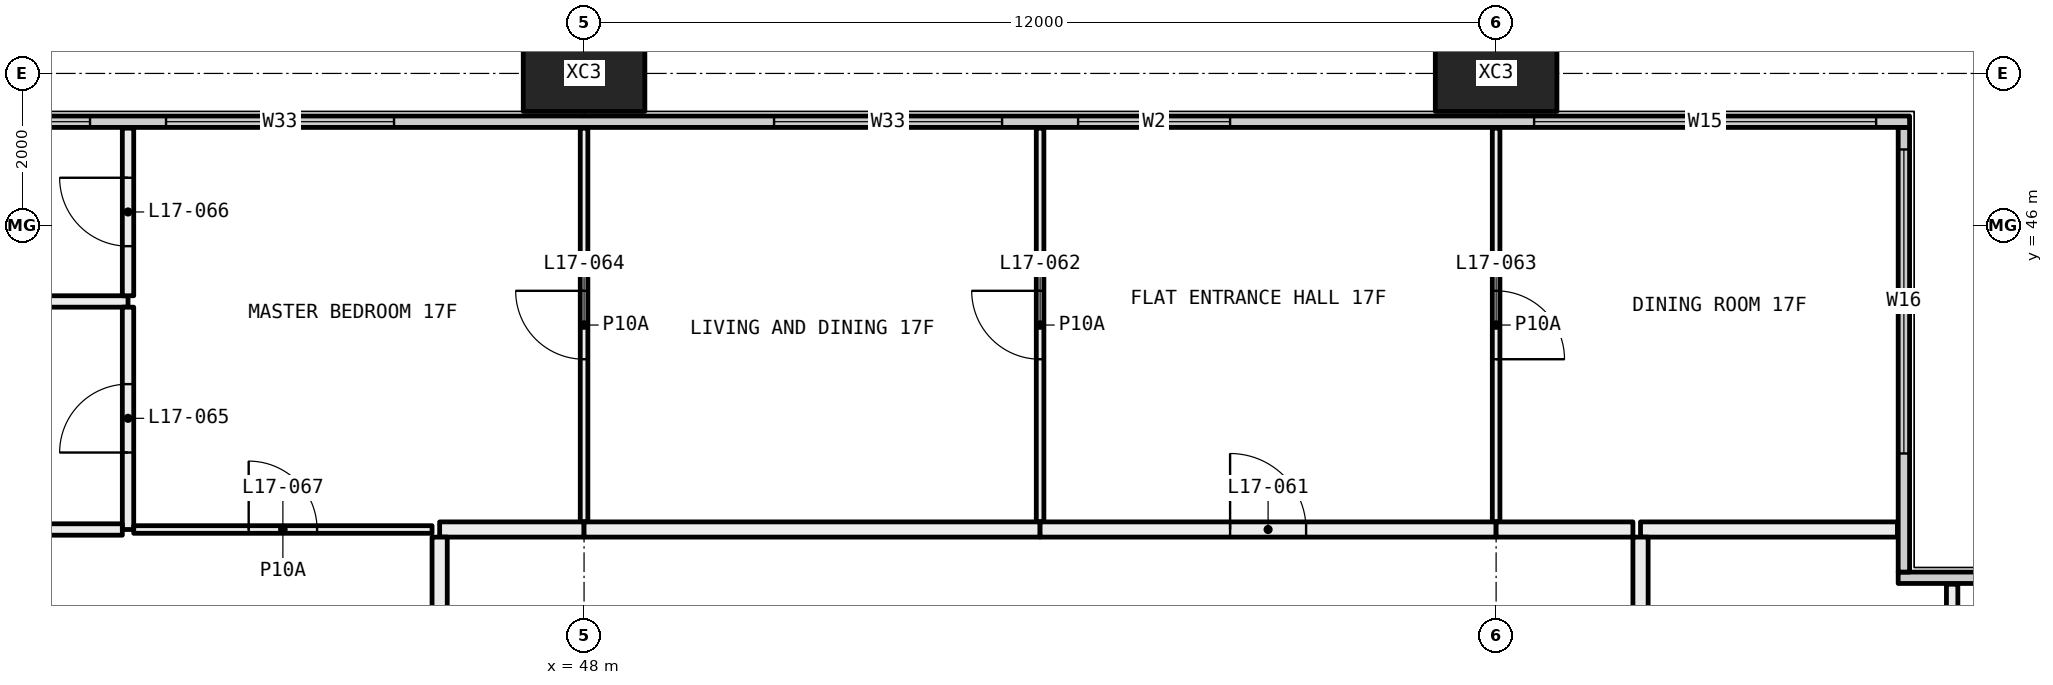
"""IFC4 building model, lengths in metres.
Left out: names, types, materials, properties, quantities, classifications, styles, units other than length and angle.
Written with IfcOpenShell. Run it as: python <this file> out.ifc"""

import sys

from ifc_helpers import new_model, si_unit, direction, frame, frame_2d, origin, origin_2d, place, context, subcontext, project, spatial, rectangle, hollow_rectangle, extrude, element, fill, save


model = new_model("IFC4")
c1 = context("Model", 3, precision=1e-05, world=origin(), true_north=direction((0.0, 1.0)))
c2 = subcontext(c1, "Body", "Model", "MODEL_VIEW")
j1 = project(units=[si_unit("LENGTHUNIT", "METRE"), si_unit("PLANEANGLEUNIT", "RADIAN")], contexts=[c1])
p1 = place(None, origin())
s1 = spatial("IfcSite", under=j1, at=p1, CompositionType="ELEMENT")
p2 = place(p1, origin())
s2 = spatial("IfcBuilding", under=s1, at=p2, CompositionType="ELEMENT")
p3 = place(p2, frame((0.0, 0.0, 71.4)))
s3 = spatial("IfcBuildingStorey", under=s2, at=p3, CompositionType="ELEMENT", Elevation=71.4)
for number, where, z_axis, x_axis in (
    (1, (48.0, 48.0, -0.4), (0.0, 0.0, 1.0), (1.0, 0.0, 0.0)),
    (2, (60.0, 48.0, -0.4), (0.0, 0.0, 1.0), (1.0, 0.0, 0.0)),
):
    element("IfcColumn", number, at=place(p3, frame(where, z_axis=z_axis, x_axis=x_axis)), inside=s3, PredefinedType="COLUMN", context=c2, shape_type="SweptSolid", body=[
        extrude(hollow_rectangle(XDim=1.6, YDim=1.0, WallThickness=0.065, at=origin_2d()), origin(), (0.0, 0.0, 1.0), 3.45),
    ])
p4 = place(p3, frame((65.29, 41.365, 0.0), z_axis=(0.0, 0.0, 1.0), x_axis=(1.0, 0.0, 0.0)))
e3 = element("IfcWall", 3, at=p4, inside=s3, PredefinedType="ELEMENTEDWALL", context=c2, shape_type="SweptSolid", body=[
    extrude(rectangle(XDim=6.15, YDim=0.15, at=frame_2d((3.075, 0.0))), origin(), (0.0, 0.0, 1.0), 3.05),
])
p5 = place(p4, frame((1.71, 0.0, 0.45)))
e4 = element("IfcOpeningElement", 4, at=p5, cuts=e3, PredefinedType="OPENING", context=c2, shape_type="SweptSolid", body=[
    extrude(rectangle(XDim=4.0, YDim=2.55, at=frame_2d((2.0, 1.275))), frame((0.0, 0.085, 0.0), z_axis=(0.0, -1.0, 0.0), x_axis=(1.0, 0.0, 0.0)), (0.0, 0.0, 1.0), 0.17),
])
p6 = place(p3, frame((65.365, 41.44, 0.0), z_axis=(0.0, 0.0, 1.0), x_axis=(0.0, 1.0, 0.0)))
e5 = element("IfcWall", 5, at=p6, inside=s3, PredefinedType="ELEMENTEDWALL", context=c2, shape_type="SweptSolid", body=[
    extrude(rectangle(XDim=5.85, YDim=0.15, at=frame_2d((2.925, 0.0))), origin(), (0.0, 0.0, 1.0), 3.05),
])
p7 = place(p6, frame((1.56, 0.0, 0.45)))
e6 = element("IfcOpeningElement", 6, at=p7, cuts=e5, PredefinedType="OPENING", context=c2, shape_type="SweptSolid", body=[
    extrude(rectangle(XDim=4.0, YDim=2.55, at=frame_2d((2.0, 1.275))), frame((0.0, 0.085, 0.0), z_axis=(0.0, -1.0, 0.0), x_axis=(1.0, 0.0, 0.0)), (0.0, 0.0, 1.0), 0.17),
])
p8 = place(p3, frame((6.56, 47.365, 0.0), z_axis=(0.0, 0.0, 1.0), x_axis=(1.0, 0.0, 0.0)))
e7 = element("IfcWall", 7, at=p8, inside=s3, PredefinedType="ELEMENTEDWALL", context=c2, shape_type="SweptSolid", body=[
    extrude(rectangle(XDim=58.88, YDim=0.15, at=frame_2d((29.44, 0.0))), origin(), (0.0, 0.0, 1.0), 3.05),
])
p9 = place(p8, frame((0.44, 0.0, 0.45)))
e8 = element("IfcOpeningElement", 8, at=p9, cuts=e7, PredefinedType="OPENING", context=c2, shape_type="SweptSolid", body=[
    extrude(rectangle(XDim=4.5, YDim=2.55, at=frame_2d((2.25, 1.275))), frame((0.0, 0.085, 0.0), z_axis=(0.0, -1.0, 0.0), x_axis=(1.0, 0.0, 0.0)), (0.0, 0.0, 1.0), 0.17),
])
p10 = place(p8, frame((7.94, 0.0, 0.45)))
e9 = element("IfcOpeningElement", 9, at=p10, cuts=e7, PredefinedType="OPENING", context=c2, shape_type="SweptSolid", body=[
    extrude(rectangle(XDim=3.0, YDim=2.55, at=frame_2d((1.5, 1.275))), frame((0.0, 0.085, 0.0), z_axis=(0.0, -1.0, 0.0), x_axis=(1.0, 0.0, 0.0)), (0.0, 0.0, 1.0), 0.17),
])
p11 = place(p8, frame((11.94, 0.0, 0.45)))
e10 = element("IfcOpeningElement", 10, at=p11, cuts=e7, PredefinedType="OPENING", context=c2, shape_type="SweptSolid", body=[
    extrude(rectangle(XDim=3.0, YDim=2.55, at=frame_2d((1.5, 1.275))), frame((0.0, 0.085, 0.0), z_axis=(0.0, -1.0, 0.0), x_axis=(1.0, 0.0, 0.0)), (0.0, 0.0, 1.0), 0.17),
])
p12 = place(p8, frame((19.94, 0.0, 0.45)))
e11 = element("IfcOpeningElement", 11, at=p12, cuts=e7, PredefinedType="OPENING", context=c2, shape_type="SweptSolid", body=[
    extrude(rectangle(XDim=3.0, YDim=2.55, at=frame_2d((1.5, 1.275))), frame((0.0, 0.085, 0.0), z_axis=(0.0, -1.0, 0.0), x_axis=(1.0, 0.0, 0.0)), (0.0, 0.0, 1.0), 0.17),
])
p13 = place(p8, frame((23.94, 0.0, 0.45)))
e12 = element("IfcOpeningElement", 12, at=p13, cuts=e7, PredefinedType="OPENING", context=c2, shape_type="SweptSolid", body=[
    extrude(rectangle(XDim=2.0, YDim=2.55, at=frame_2d((1.0, 1.275))), frame((0.0, 0.085, 0.0), z_axis=(0.0, -1.0, 0.0), x_axis=(1.0, 0.0, 0.0)), (0.0, 0.0, 1.0), 0.17),
])
p14 = place(p8, frame((31.94, 0.0, 0.45)))
e13 = element("IfcOpeningElement", 13, at=p14, cuts=e7, PredefinedType="OPENING", context=c2, shape_type="SweptSolid", body=[
    extrude(rectangle(XDim=3.0, YDim=2.55, at=frame_2d((1.5, 1.275))), frame((0.0, 0.085, 0.0), z_axis=(0.0, -1.0, 0.0), x_axis=(1.0, 0.0, 0.0)), (0.0, 0.0, 1.0), 0.17),
])
p15 = place(p8, frame((35.94, 0.0, 0.45)))
e14 = element("IfcOpeningElement", 14, at=p15, cuts=e7, PredefinedType="OPENING", context=c2, shape_type="SweptSolid", body=[
    extrude(rectangle(XDim=3.0, YDim=2.55, at=frame_2d((1.5, 1.275))), frame((0.0, 0.085, 0.0), z_axis=(0.0, -1.0, 0.0), x_axis=(1.0, 0.0, 0.0)), (0.0, 0.0, 1.0), 0.17),
])
p16 = place(p8, frame((43.94, 0.0, 0.45)))
e15 = element("IfcOpeningElement", 15, at=p16, cuts=e7, PredefinedType="OPENING", context=c2, shape_type="SweptSolid", body=[
    extrude(rectangle(XDim=3.0, YDim=2.55, at=frame_2d((1.5, 1.275))), frame((0.0, 0.085, 0.0), z_axis=(0.0, -1.0, 0.0), x_axis=(1.0, 0.0, 0.0)), (0.0, 0.0, 1.0), 0.17),
])
p17 = place(p8, frame((47.94, 0.0, 0.45)))
e16 = element("IfcOpeningElement", 16, at=p17, cuts=e7, PredefinedType="OPENING", context=c2, shape_type="SweptSolid", body=[
    extrude(rectangle(XDim=2.0, YDim=2.55, at=frame_2d((1.0, 1.275))), frame((0.0, 0.085, 0.0), z_axis=(0.0, -1.0, 0.0), x_axis=(1.0, 0.0, 0.0)), (0.0, 0.0, 1.0), 0.17),
])
p18 = place(p8, frame((53.94, 0.0, 0.45)))
e17 = element("IfcOpeningElement", 17, at=p18, cuts=e7, PredefinedType="OPENING", context=c2, shape_type="SweptSolid", body=[
    extrude(rectangle(XDim=4.5, YDim=2.55, at=frame_2d((2.25, 1.275))), frame((0.0, 0.085, 0.0), z_axis=(0.0, -1.0, 0.0), x_axis=(1.0, 0.0, 0.0)), (0.0, 0.0, 1.0), 0.17),
])
p19 = place(p3, frame((66.0, 41.28, 0.0), z_axis=(0.0, 0.0, 1.0), x_axis=(0.0, -1.0, 0.0)))
e18 = element("IfcWall", 18, at=p19, inside=s3, PredefinedType="PARTITIONING", context=c2, shape_type="SweptSolid", body=[
    extrude(rectangle(XDim=2.28, YDim=0.15, at=frame_2d((1.14, 0.0))), origin(), (0.0, 0.0, 1.0), 3.05),
])
p20 = place(p3, frame((65.28, 42.0, 0.0), z_axis=(0.0, 0.0, 1.0), x_axis=(-1.0, 0.0, 0.0)))
e19 = element("IfcWall", 19, at=p20, inside=s3, PredefinedType="PARTITIONING", context=c2, shape_type="SweptSolid", body=[
    extrude(rectangle(XDim=3.38, YDim=0.2, at=frame_2d((1.69, 0.0))), origin(), (0.0, 0.0, 1.0), 3.05),
])
p21 = place(p3, frame((61.9, 41.9, 0.0), z_axis=(0.0, 0.0, 1.0), x_axis=(0.0, -1.0, 0.0)))
e20 = element("IfcWall", 20, at=p21, inside=s3, PredefinedType="PARTITIONING", context=c2, shape_type="SweptSolid", body=[
    extrude(rectangle(XDim=2.9, YDim=0.2, at=frame_2d((1.45, 0.0))), origin(), (0.0, 0.0, 1.0), 3.05),
])
p22 = place(p3, frame((42.0, 45.0, 0.0), z_axis=(0.0, 0.0, 1.0), x_axis=(-1.0, 0.0, 0.0)))
e21 = element("IfcWall", 21, at=p22, inside=s3, PredefinedType="PARTITIONING", context=c2, shape_type="SweptSolid", body=[
    extrude(rectangle(XDim=5.9, YDim=0.15, at=frame_2d((2.95, 0.0))), origin(), (0.0, 0.0, 1.0), 3.05),
])
p23 = place(p3, frame((42.0, 42.0, 0.0), z_axis=(0.0, 0.0, 1.0), x_axis=(0.0, 1.0, 0.0)))
e22 = element("IfcWall", 22, at=p23, inside=s3, PredefinedType="PARTITIONING", context=c2, shape_type="SweptSolid", body=[
    extrude(rectangle(XDim=2.925, YDim=0.15, at=frame_2d((1.462, 0.0))), origin(), (0.0, 0.0, 1.0), 3.05),
])
p24 = place(p23, frame((1.012, 0.0, 0.0)))
e23 = element("IfcOpeningElement", 23, at=p24, cuts=e22, PredefinedType="OPENING", context=c2, shape_type="SweptSolid", body=[
    extrude(rectangle(XDim=0.9, YDim=2.1, at=frame_2d((0.45, 1.05))), frame((0.0, 0.085, 0.0), z_axis=(0.0, -1.0, 0.0), x_axis=(1.0, 0.0, 0.0)), (0.0, 0.0, 1.0), 0.17),
])
p25 = place(p3, frame((40.9, 42.0, 0.0), z_axis=(0.0, 0.0, 1.0), x_axis=(1.0, 0.0, 0.0)))
e24 = element("IfcWall", 24, at=p25, inside=s3, PredefinedType="PARTITIONING", context=c2, shape_type="SweptSolid", body=[
    extrude(rectangle(XDim=1.025, YDim=0.15, at=frame_2d((0.513, 0.0))), origin(), (0.0, 0.0, 1.0), 3.05),
])
p26 = place(p3, frame((42.0, 45.075, 0.0), z_axis=(0.0, 0.0, 1.0), x_axis=(0.0, 1.0, 0.0)))
e25 = element("IfcWall", 25, at=p26, inside=s3, PredefinedType="PARTITIONING", context=c2, shape_type="SweptSolid", body=[
    extrude(rectangle(XDim=2.205, YDim=0.15, at=frame_2d((1.103, 0.0))), origin(), (0.0, 0.0, 1.0), 3.05),
])
p27 = place(p26, frame((0.653, 0.0, 0.0)))
e26 = element("IfcOpeningElement", 26, at=p27, cuts=e25, PredefinedType="OPENING", context=c2, shape_type="SweptSolid", body=[
    extrude(rectangle(XDim=0.9, YDim=2.1, at=frame_2d((0.45, 1.05))), frame((0.0, 0.085, 0.0), z_axis=(0.0, -1.0, 0.0), x_axis=(1.0, 0.0, 0.0)), (0.0, 0.0, 1.0), 0.17),
])
p28 = place(p3, frame((48.0, 42.1, 0.0), z_axis=(0.0, 0.0, 1.0), x_axis=(0.0, 1.0, 0.0)))
e27 = element("IfcWall", 27, at=p28, inside=s3, PredefinedType="PARTITIONING", context=c2, shape_type="SweptSolid", body=[
    extrude(rectangle(XDim=5.18, YDim=0.1, at=frame_2d((2.59, 0.0))), origin(), (0.0, 0.0, 1.0), 3.05),
])
p29 = place(p28, frame((2.14, 0.0, 0.0)))
e28 = element("IfcOpeningElement", 28, at=p29, cuts=e27, PredefinedType="OPENING", context=c2, shape_type="SweptSolid", body=[
    extrude(rectangle(XDim=0.9, YDim=2.1, at=frame_2d((0.45, 1.05))), frame((0.0, 0.06, 0.0), z_axis=(0.0, -1.0, 0.0), x_axis=(1.0, 0.0, 0.0)), (0.0, 0.0, 1.0), 0.12),
])
p30 = place(p3, frame((42.075, 42.0, 0.0), z_axis=(0.0, 0.0, 1.0), x_axis=(1.0, 0.0, 0.0)))
e29 = element("IfcWall", 29, at=p30, inside=s3, PredefinedType="PARTITIONING", context=c2, shape_type="SweptSolid", body=[
    extrude(rectangle(XDim=3.925, YDim=0.1, at=frame_2d((1.962, 0.0))), origin(), (0.0, 0.0, 1.0), 3.05),
])
p31 = place(p30, frame((1.512, 0.0, 0.0)))
e30 = element("IfcOpeningElement", 30, at=p31, cuts=e29, PredefinedType="OPENING", context=c2, shape_type="SweptSolid", body=[
    extrude(rectangle(XDim=0.9, YDim=2.1, at=frame_2d((0.45, 1.05))), frame((0.0, 0.06, 0.0), z_axis=(0.0, -1.0, 0.0), x_axis=(1.0, 0.0, 0.0)), (0.0, 0.0, 1.0), 0.12),
])
p32 = place(p3, frame((46.1, 42.0, 0.0), z_axis=(0.0, 0.0, 1.0), x_axis=(1.0, 0.0, 0.0)))
e31 = element("IfcWall", 31, at=p32, inside=s3, PredefinedType="PARTITIONING", context=c2, shape_type="SweptSolid", body=[
    extrude(rectangle(XDim=1.9, YDim=0.2, at=frame_2d((0.95, 0.0))), origin(), (0.0, 0.0, 1.0), 3.05),
])
p33 = place(p3, frame((54.0, 42.1, 0.0), z_axis=(0.0, 0.0, 1.0), x_axis=(0.0, 1.0, 0.0)))
e32 = element("IfcWall", 32, at=p33, inside=s3, PredefinedType="PARTITIONING", context=c2, shape_type="SweptSolid", body=[
    extrude(rectangle(XDim=5.18, YDim=0.1, at=frame_2d((2.59, 0.0))), origin(), (0.0, 0.0, 1.0), 3.05),
])
p34 = place(p33, frame((2.14, 0.0, 0.0)))
e33 = element("IfcOpeningElement", 33, at=p34, cuts=e32, PredefinedType="OPENING", context=c2, shape_type="SweptSolid", body=[
    extrude(rectangle(XDim=0.9, YDim=2.1, at=frame_2d((0.45, 1.05))), frame((0.0, 0.06, 0.0), z_axis=(0.0, -1.0, 0.0), x_axis=(1.0, 0.0, 0.0)), (0.0, 0.0, 1.0), 0.12),
])
p35 = place(p3, frame((48.0, 42.0, 0.0), z_axis=(0.0, 0.0, 1.0), x_axis=(1.0, 0.0, 0.0)))
e34 = element("IfcWall", 34, at=p35, inside=s3, PredefinedType="PARTITIONING", context=c2, shape_type="SweptSolid", body=[
    extrude(rectangle(XDim=6.0, YDim=0.2, at=frame_2d((3.0, 0.0))), origin(), (0.0, 0.0, 1.0), 3.05),
])
p36 = place(p3, frame((60.0, 42.1, 0.0), z_axis=(0.0, 0.0, 1.0), x_axis=(0.0, 1.0, 0.0)))
e35 = element("IfcWall", 35, at=p36, inside=s3, PredefinedType="PARTITIONING", context=c2, shape_type="SweptSolid", body=[
    extrude(rectangle(XDim=5.18, YDim=0.1, at=frame_2d((2.59, 0.0))), origin(), (0.0, 0.0, 1.0), 3.05),
])
p37 = place(p36, frame((2.14, 0.0, 0.0)))
e36 = element("IfcOpeningElement", 36, at=p37, cuts=e35, PredefinedType="OPENING", context=c2, shape_type="SweptSolid", body=[
    extrude(rectangle(XDim=0.9, YDim=2.1, at=frame_2d((0.45, 1.05))), frame((0.0, 0.06, 0.0), z_axis=(0.0, -1.0, 0.0), x_axis=(1.0, 0.0, 0.0)), (0.0, 0.0, 1.0), 0.12),
])
p38 = place(p3, frame((54.0, 42.0, 0.0), z_axis=(0.0, 0.0, 1.0), x_axis=(1.0, 0.0, 0.0)))
e37 = element("IfcWall", 37, at=p38, inside=s3, PredefinedType="PARTITIONING", context=c2, shape_type="SweptSolid", body=[
    extrude(rectangle(XDim=6.0, YDim=0.2, at=frame_2d((3.0, 0.0))), origin(), (0.0, 0.0, 1.0), 3.05),
])
p39 = place(p38, frame((2.5, 0.0, 0.0)))
e38 = element("IfcOpeningElement", 38, at=p39, cuts=e37, PredefinedType="OPENING", context=c2, shape_type="SweptSolid", body=[
    extrude(rectangle(XDim=1.0, YDim=2.1, at=frame_2d((0.5, 1.05))), frame((0.0, 0.11, 0.0), z_axis=(0.0, -1.0, 0.0), x_axis=(1.0, 0.0, 0.0)), (0.0, 0.0, 1.0), 0.22),
])
p40 = place(p3, frame((60.0, 42.0, 0.0), z_axis=(0.0, 0.0, 1.0), x_axis=(1.0, 0.0, 0.0)))
e39 = element("IfcWall", 39, at=p40, inside=s3, PredefinedType="PARTITIONING", context=c2, shape_type="SweptSolid", body=[
    extrude(rectangle(XDim=1.8, YDim=0.2, at=frame_2d((0.9, 0.0))), origin(), (0.0, 0.0, 1.0), 3.05),
])
p41 = place(p3, frame((46.1, 36.1, 0.0), z_axis=(0.0, 0.0, 1.0), x_axis=(0.0, 1.0, 0.0)))
e40 = element("IfcWall", 40, at=p41, inside=s3, PredefinedType="PARTITIONING", context=c2, shape_type="SweptSolid", body=[
    extrude(rectangle(XDim=5.8, YDim=0.2, at=frame_2d((2.9, 0.0))), origin(), (0.0, 0.0, 1.0), 3.05),
])
p42 = place(p7, origin())
e41 = element("IfcWindow", 41, at=p42, inside=s3, PartitioningType="SINGLE_PANEL", PredefinedType="WINDOW", context=c2, shape_type="SweptSolid", body=[
    extrude(rectangle(XDim=4.0, YDim=2.55, at=frame_2d((2.0, 1.275))), frame((0.0, 0.03, 0.0), z_axis=(0.0, -1.0, 0.0), x_axis=(1.0, 0.0, 0.0)), (0.0, 0.0, 1.0), 0.06),
])
fill(e6, e41)
p43 = place(p14, origin())
e42 = element("IfcWindow", 42, at=p43, inside=s3, PartitioningType="SINGLE_PANEL", PredefinedType="WINDOW", context=c2, shape_type="SweptSolid", body=[
    extrude(rectangle(XDim=3.0, YDim=2.55, at=frame_2d((1.5, 1.275))), frame((0.0, 0.03, 0.0), z_axis=(0.0, -1.0, 0.0), x_axis=(1.0, 0.0, 0.0)), (0.0, 0.0, 1.0), 0.06),
])
fill(e13, e42)
p44 = place(p15, origin())
e43 = element("IfcWindow", 43, at=p44, inside=s3, PartitioningType="SINGLE_PANEL", PredefinedType="WINDOW", context=c2, shape_type="SweptSolid", body=[
    extrude(rectangle(XDim=3.0, YDim=2.55, at=frame_2d((1.5, 1.275))), frame((0.0, 0.03, 0.0), z_axis=(0.0, -1.0, 0.0), x_axis=(1.0, 0.0, 0.0)), (0.0, 0.0, 1.0), 0.06),
])
fill(e14, e43)
p45 = place(p16, origin())
e44 = element("IfcWindow", 44, at=p45, inside=s3, PartitioningType="SINGLE_PANEL", PredefinedType="WINDOW", context=c2, shape_type="SweptSolid", body=[
    extrude(rectangle(XDim=3.0, YDim=2.55, at=frame_2d((1.5, 1.275))), frame((0.0, 0.03, 0.0), z_axis=(0.0, -1.0, 0.0), x_axis=(1.0, 0.0, 0.0)), (0.0, 0.0, 1.0), 0.06),
])
fill(e15, e44)
p46 = place(p17, origin())
e45 = element("IfcWindow", 45, at=p46, inside=s3, PartitioningType="SINGLE_PANEL", PredefinedType="WINDOW", context=c2, shape_type="SweptSolid", body=[
    extrude(rectangle(XDim=2.0, YDim=2.55, at=frame_2d((1.0, 1.275))), frame((0.0, 0.03, 0.0), z_axis=(0.0, -1.0, 0.0), x_axis=(1.0, 0.0, 0.0)), (0.0, 0.0, 1.0), 0.06),
])
fill(e16, e45)
p47 = place(p18, origin())
e46 = element("IfcWindow", 46, at=p47, inside=s3, PartitioningType="SINGLE_PANEL", PredefinedType="WINDOW", context=c2, shape_type="SweptSolid", body=[
    extrude(rectangle(XDim=4.5, YDim=2.55, at=frame_2d((2.25, 1.275))), frame((0.0, 0.03, 0.0), z_axis=(0.0, -1.0, 0.0), x_axis=(1.0, 0.0, 0.0)), (0.0, 0.0, 1.0), 0.06),
])
fill(e17, e46)
p48 = place(p39, origin())
e47 = element("IfcDoor", 47, at=p48, inside=s3, OperationType="SINGLE_SWING_RIGHT", PredefinedType="DOOR", context=c2, shape_type="SweptSolid", body=[
    extrude(rectangle(XDim=1.0, YDim=2.1, at=frame_2d((0.5, 1.05))), frame((0.0, 0.025, 0.0), z_axis=(0.0, -1.0, 0.0), x_axis=(1.0, 0.0, 0.0)), (0.0, 0.0, 1.0), 0.05),
])
fill(e38, e47)
p49 = place(p34, origin())
e48 = element("IfcDoor", 48, at=p49, inside=s3, OperationType="SINGLE_SWING_LEFT", PredefinedType="DOOR", context=c2, shape_type="SweptSolid", body=[
    extrude(rectangle(XDim=0.9, YDim=2.1, at=frame_2d((0.45, 1.05))), frame((0.0, 0.025, 0.0), z_axis=(0.0, -1.0, 0.0), x_axis=(1.0, 0.0, 0.0)), (0.0, 0.0, 1.0), 0.05),
])
fill(e33, e48)
p50 = place(p37, frame((0.9, 0.0, 0.0), x_axis=(-1.0, 0.0, 0.0)))
e49 = element("IfcDoor", 49, at=p50, inside=s3, OperationType="SINGLE_SWING_LEFT", PredefinedType="DOOR", context=c2, shape_type="SweptSolid", body=[
    extrude(rectangle(XDim=0.9, YDim=2.1, at=frame_2d((0.45, 1.05))), frame((0.0, 0.025, 0.0), z_axis=(0.0, -1.0, 0.0), x_axis=(1.0, 0.0, 0.0)), (0.0, 0.0, 1.0), 0.05),
])
fill(e36, e49)
p51 = place(p29, origin())
e50 = element("IfcDoor", 50, at=p51, inside=s3, OperationType="SINGLE_SWING_LEFT", PredefinedType="DOOR", context=c2, shape_type="SweptSolid", body=[
    extrude(rectangle(XDim=0.9, YDim=2.1, at=frame_2d((0.45, 1.05))), frame((0.0, 0.025, 0.0), z_axis=(0.0, -1.0, 0.0), x_axis=(1.0, 0.0, 0.0)), (0.0, 0.0, 1.0), 0.05),
])
fill(e28, e50)
p52 = place(p24, origin())
e51 = element("IfcDoor", 51, at=p52, inside=s3, OperationType="SINGLE_SWING_RIGHT", PredefinedType="DOOR", context=c2, shape_type="SweptSolid", body=[
    extrude(rectangle(XDim=0.9, YDim=2.1, at=frame_2d((0.45, 1.05))), frame((0.0, 0.025, 0.0), z_axis=(0.0, -1.0, 0.0), x_axis=(1.0, 0.0, 0.0)), (0.0, 0.0, 1.0), 0.05),
])
fill(e23, e51)
p53 = place(p27, origin())
e52 = element("IfcDoor", 52, at=p53, inside=s3, OperationType="SINGLE_SWING_LEFT", PredefinedType="DOOR", context=c2, shape_type="SweptSolid", body=[
    extrude(rectangle(XDim=0.9, YDim=2.1, at=frame_2d((0.45, 1.05))), frame((0.0, 0.025, 0.0), z_axis=(0.0, -1.0, 0.0), x_axis=(1.0, 0.0, 0.0)), (0.0, 0.0, 1.0), 0.05),
])
fill(e26, e52)
p54 = place(p31, origin())
e53 = element("IfcDoor", 53, at=p54, inside=s3, OperationType="SINGLE_SWING_RIGHT", PredefinedType="DOOR", context=c2, shape_type="SweptSolid", body=[
    extrude(rectangle(XDim=0.9, YDim=2.1, at=frame_2d((0.45, 1.05))), frame((0.0, 0.025, 0.0), z_axis=(0.0, -1.0, 0.0), x_axis=(1.0, 0.0, 0.0)), (0.0, 0.0, 1.0), 0.05),
])
fill(e30, e53)
save(model, sys.argv[1])
